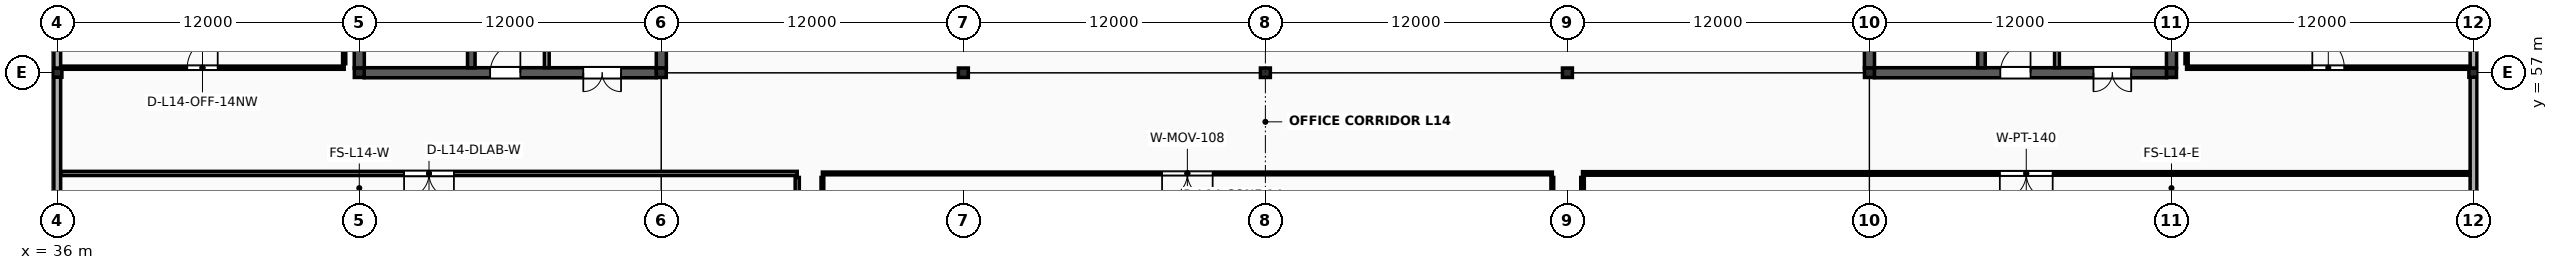
"""IFC4 building model, lengths in metres.
Left out: names, types, materials, properties, quantities, classifications, styles, units other than length and angle.
Written with IfcOpenShell. Run it as: python <this file> out.ifc"""

import sys

from ifc_helpers import new_model, si_unit, direction, frame, frame_2d, origin, origin_2d, place, context, subcontext, project, spatial, rectangle, i_section, extrude, element, fill, save


model = new_model("IFC4")
c1 = context("Model", 3, precision=1e-05, world=origin(), true_north=direction((0.0, 1.0)))
c2 = subcontext(c1, "Body", "Model", "MODEL_VIEW")
j1 = project(units=[si_unit("LENGTHUNIT", "METRE"), si_unit("PLANEANGLEUNIT", "RADIAN")], contexts=[c1])
p1 = place(None, origin())
s1 = spatial("IfcSite", under=j1, at=p1, CompositionType="ELEMENT")
p2 = place(p1, origin())
s2 = spatial("IfcBuilding", under=s1, at=p2, CompositionType="ELEMENT")
p3 = place(p2, frame((0.0, 0.0, 57.6)))
s3 = spatial("IfcBuildingStorey", under=s2, at=p3, CompositionType="ELEMENT", Elevation=57.6)
p4 = place(p3, frame((36.0, 57.0, 0.0), z_axis=(0.0, 0.0, 1.0), x_axis=(1.0, 0.0, 0.0)))
e1 = element("IfcColumn", 1, at=p4, inside=s3, PredefinedType="COLUMN", context=c2, shape_type="SweptSolid", body=[
    extrude(i_section(OverallWidth=0.369, OverallDepth=0.356, WebThickness=0.011, FlangeThickness=0.018, FilletRadius=0.018, at=origin_2d()), origin(), (0.0, 0.0, 1.0), 4.0),
])
for number, where, z_axis, x_axis in (
    (2, (48.0, 57.0, 0.0), (0.0, 0.0, 1.0), (1.0, 0.0, 0.0)),
    (3, (60.0, 57.0, 0.0), (0.0, 0.0, 1.0), (1.0, 0.0, 0.0)),
    (4, (72.0, 57.0, 0.0), (0.0, 0.0, 1.0), (1.0, 0.0, 0.0)),
    (5, (84.0, 57.0, 0.0), (0.0, 0.0, 1.0), (1.0, 0.0, 0.0)),
    (6, (96.0, 57.0, 0.0), (0.0, 0.0, 1.0), (1.0, 0.0, 0.0)),
    (7, (108.0, 57.0, 0.0), (0.0, 0.0, 1.0), (1.0, 0.0, 0.0)),
    (8, (120.0, 57.0, 0.0), (0.0, 0.0, 1.0), (1.0, 0.0, 0.0)),
):
    element("IfcColumn", number, at=place(p3, frame(where, z_axis=z_axis, x_axis=x_axis)), inside=s3, PredefinedType="COLUMN", context=c2, shape_type="SweptSolid", body=[
        extrude(i_section(OverallWidth=0.394, OverallDepth=0.375, WebThickness=0.017, FlangeThickness=0.028, FilletRadius=0.018, at=origin_2d()), origin(), (0.0, 0.0, 1.0), 4.0),
    ])
p5 = place(p3, frame((132.0, 57.0, 0.0), z_axis=(0.0, 0.0, 1.0), x_axis=(1.0, 0.0, 0.0)))
e9 = element("IfcColumn", 9, at=p5, inside=s3, PredefinedType="COLUMN", context=c2, shape_type="SweptSolid", body=[
    extrude(i_section(OverallWidth=0.369, OverallDepth=0.356, WebThickness=0.011, FlangeThickness=0.018, FilletRadius=0.018, at=origin_2d()), origin(), (0.0, 0.0, 1.0), 4.0),
])
p6 = place(p3, frame((48.194, 57.0, 0.0), z_axis=(0.0, 0.0, 1.0), x_axis=(1.0, 0.0, 0.0)))
e10 = element("IfcWall", 10, at=p6, inside=s3, PredefinedType="SHEAR", context=c2, shape_type="SweptSolid", body=[
    extrude(rectangle(XDim=11.612, YDim=0.4, at=frame_2d((5.806, 0.0))), origin(), (0.0, 0.0, 1.0), 3.853),
])
p7 = place(p6, frame((5.006, 0.0, 0.0)))
e11 = element("IfcOpeningElement", 11, at=p7, cuts=e10, PredefinedType="OPENING", context=c2, shape_type="SweptSolid", body=[
    extrude(rectangle(XDim=1.2, YDim=2.2, at=frame_2d((0.6, 1.1))), frame((0.0, 0.215, 0.0), z_axis=(0.0, -1.0, 0.0), x_axis=(1.0, 0.0, 0.0)), (0.0, 0.0, 1.0), 0.43),
])
p8 = place(p6, frame((8.706, 0.0, 0.0)))
e12 = element("IfcOpeningElement", 12, at=p8, cuts=e10, PredefinedType="OPENING", context=c2, shape_type="SweptSolid", body=[
    extrude(rectangle(XDim=1.5, YDim=2.25, at=frame_2d((0.75, 1.125))), frame((0.0, 0.215, 0.0), z_axis=(0.0, -1.0, 0.0), x_axis=(1.0, 0.0, 0.0)), (0.0, 0.0, 1.0), 0.43),
])
for number, where, z_axis, x_axis in (
    (13, (48.0, 57.185, 0.0), (0.0, 0.0, 1.0), (0.0, 1.0, 0.0)),
    (14, (60.0, 57.185, 0.0), (0.0, 0.0, 1.0), (0.0, 1.0, 0.0)),
):
    element("IfcWall", number, at=place(p3, frame(where, z_axis=z_axis, x_axis=x_axis)), inside=s3, PredefinedType="SHEAR", context=c2, shape_type="SweptSolid", body=[
        extrude(rectangle(XDim=11.64, YDim=0.4, at=frame_2d((5.82, 0.0))), origin(), (0.0, 0.0, 1.0), 3.853),
    ])
p9 = place(p3, frame((52.45, 57.197, 0.0), z_axis=(0.0, 0.0, 1.0), x_axis=(0.0, 1.0, 0.0)))
e15 = element("IfcWall", 15, at=p9, inside=s3, PredefinedType="SHEAR", context=c2, shape_type="SweptSolid", body=[
    extrude(rectangle(XDim=11.606, YDim=0.3, at=frame_2d((5.803, 0.0))), origin(), (0.0, 0.0, 1.0), 3.853),
])
p10 = place(p9, frame((0.9, 0.0, 0.0)))
e16 = element("IfcOpeningElement", 16, at=p10, cuts=e15, PredefinedType="OPENING", context=c2, shape_type="SweptSolid", body=[
    extrude(rectangle(XDim=1.1, YDim=2.2, at=frame_2d((0.55, 1.1))), frame((0.0, 0.165, 0.0), z_axis=(0.0, -1.0, 0.0), x_axis=(1.0, 0.0, 0.0)), (0.0, 0.0, 1.0), 0.33),
])
p11 = place(p3, frame((55.45, 57.2, 0.0), z_axis=(0.0, 0.0, 1.0), x_axis=(0.0, 1.0, 0.0)))
e17 = element("IfcWall", 17, at=p11, inside=s3, PredefinedType="SOLIDWALL", context=c2, shape_type="SweptSolid", body=[
    extrude(rectangle(XDim=8.48, YDim=0.19, at=frame_2d((4.24, 0.0))), origin(), (0.0, 0.0, 1.0), 3.843),
])
p12 = place(p11, frame((3.6, 0.0, 0.0)))
e18 = element("IfcOpeningElement", 18, at=p12, cuts=e17, PredefinedType="OPENING", context=c2, shape_type="SweptSolid", body=[
    extrude(rectangle(XDim=1.04, YDim=2.18, at=frame_2d((0.52, 1.09))), frame((0.0, 0.11, 0.0), z_axis=(0.0, -1.0, 0.0), x_axis=(1.0, 0.0, 0.0)), (0.0, 0.0, 1.0), 0.22),
])
p13 = place(p3, frame((108.194, 57.0, 0.0), z_axis=(0.0, 0.0, 1.0), x_axis=(1.0, 0.0, 0.0)))
e19 = element("IfcWall", 19, at=p13, inside=s3, PredefinedType="SHEAR", context=c2, shape_type="SweptSolid", body=[
    extrude(rectangle(XDim=11.612, YDim=0.4, at=frame_2d((5.806, 0.0))), origin(), (0.0, 0.0, 1.0), 3.853),
])
p14 = place(p13, frame((5.006, 0.0, 0.0)))
e20 = element("IfcOpeningElement", 20, at=p14, cuts=e19, PredefinedType="OPENING", context=c2, shape_type="SweptSolid", body=[
    extrude(rectangle(XDim=1.2, YDim=2.2, at=frame_2d((0.6, 1.1))), frame((0.0, 0.215, 0.0), z_axis=(0.0, -1.0, 0.0), x_axis=(1.0, 0.0, 0.0)), (0.0, 0.0, 1.0), 0.43),
])
p15 = place(p13, frame((8.706, 0.0, 0.0)))
e21 = element("IfcOpeningElement", 21, at=p15, cuts=e19, PredefinedType="OPENING", context=c2, shape_type="SweptSolid", body=[
    extrude(rectangle(XDim=1.5, YDim=2.25, at=frame_2d((0.75, 1.125))), frame((0.0, 0.215, 0.0), z_axis=(0.0, -1.0, 0.0), x_axis=(1.0, 0.0, 0.0)), (0.0, 0.0, 1.0), 0.43),
])
for number, where, z_axis, x_axis in (
    (22, (108.0, 57.185, 0.0), (0.0, 0.0, 1.0), (0.0, 1.0, 0.0)),
    (23, (120.0, 57.185, 0.0), (0.0, 0.0, 1.0), (0.0, 1.0, 0.0)),
):
    element("IfcWall", number, at=place(p3, frame(where, z_axis=z_axis, x_axis=x_axis)), inside=s3, PredefinedType="SHEAR", context=c2, shape_type="SweptSolid", body=[
        extrude(rectangle(XDim=11.64, YDim=0.4, at=frame_2d((5.82, 0.0))), origin(), (0.0, 0.0, 1.0), 3.853),
    ])
p16 = place(p3, frame((112.45, 57.197, 0.0), z_axis=(0.0, 0.0, 1.0), x_axis=(0.0, 1.0, 0.0)))
e24 = element("IfcWall", 24, at=p16, inside=s3, PredefinedType="SHEAR", context=c2, shape_type="SweptSolid", body=[
    extrude(rectangle(XDim=11.606, YDim=0.3, at=frame_2d((5.803, 0.0))), origin(), (0.0, 0.0, 1.0), 3.853),
])
p17 = place(p16, frame((0.9, 0.0, 0.0)))
e25 = element("IfcOpeningElement", 25, at=p17, cuts=e24, PredefinedType="OPENING", context=c2, shape_type="SweptSolid", body=[
    extrude(rectangle(XDim=1.1, YDim=2.2, at=frame_2d((0.55, 1.1))), frame((0.0, 0.165, 0.0), z_axis=(0.0, -1.0, 0.0), x_axis=(1.0, 0.0, 0.0)), (0.0, 0.0, 1.0), 0.33),
])
p18 = place(p3, frame((115.45, 57.2, 0.0), z_axis=(0.0, 0.0, 1.0), x_axis=(0.0, 1.0, 0.0)))
e26 = element("IfcWall", 26, at=p18, inside=s3, PredefinedType="SOLIDWALL", context=c2, shape_type="SweptSolid", body=[
    extrude(rectangle(XDim=8.48, YDim=0.19, at=frame_2d((4.24, 0.0))), origin(), (0.0, 0.0, 1.0), 3.843),
])
p19 = place(p18, frame((3.6, 0.0, 0.0)))
e27 = element("IfcOpeningElement", 27, at=p19, cuts=e26, PredefinedType="OPENING", context=c2, shape_type="SweptSolid", body=[
    extrude(rectangle(XDim=1.04, YDim=2.18, at=frame_2d((0.52, 1.09))), frame((0.0, 0.11, 0.0), z_axis=(0.0, -1.0, 0.0), x_axis=(1.0, 0.0, 0.0)), (0.0, 0.0, 1.0), 0.22),
])
p20 = place(p3, frame((36.0, 45.176, 0.0), z_axis=(0.0, 0.0, 1.0), x_axis=(0.0, 1.0, 0.0)))
e28 = element("IfcWall", 28, at=p20, inside=s3, PredefinedType="SOLIDWALL", context=c2, shape_type="SweptSolid", body=[
    extrude(rectangle(XDim=11.648, YDim=0.27, at=frame_2d((5.824, 0.0))), origin(), (0.0, 0.0, 1.0), 3.216),
])
p21 = place(p20, frame((5.094, 0.0, 0.78)))
e29 = element("IfcOpeningElement", 29, at=p21, cuts=e28, PredefinedType="OPENING", context=c2, shape_type="SweptSolid", body=[
    extrude(rectangle(XDim=1.46, YDim=1.74, at=frame_2d((0.73, 0.87))), frame((0.0, 0.15, 0.0), z_axis=(0.0, -1.0, 0.0), x_axis=(1.0, 0.0, 0.0)), (0.0, 0.0, 1.0), 0.3),
])
p22 = place(p3, frame((36.0, 57.176, 0.0), z_axis=(0.0, 0.0, 1.0), x_axis=(0.0, 1.0, 0.0)))
e30 = element("IfcWall", 30, at=p22, inside=s3, PredefinedType="SOLIDWALL", context=c2, shape_type="SweptSolid", body=[
    extrude(rectangle(XDim=11.648, YDim=0.27, at=frame_2d((5.824, 0.0))), origin(), (0.0, 0.0, 1.0), 3.216),
])
p23 = place(p22, frame((5.004, 0.0, 0.78)))
e31 = element("IfcOpeningElement", 31, at=p23, cuts=e30, PredefinedType="OPENING", context=c2, shape_type="SweptSolid", body=[
    extrude(rectangle(XDim=1.64, YDim=1.74, at=frame_2d((0.82, 0.87))), frame((0.0, 0.15, 0.0), z_axis=(0.0, -1.0, 0.0), x_axis=(1.0, 0.0, 0.0)), (0.0, 0.0, 1.0), 0.3),
])
p24 = place(p3, frame((132.0, 45.176, 0.0), z_axis=(0.0, 0.0, 1.0), x_axis=(0.0, 1.0, 0.0)))
e32 = element("IfcWall", 32, at=p24, inside=s3, PredefinedType="SOLIDWALL", context=c2, shape_type="SweptSolid", body=[
    extrude(rectangle(XDim=11.648, YDim=0.27, at=frame_2d((5.824, 0.0))), origin(), (0.0, 0.0, 1.0), 3.216),
])
p25 = place(p24, frame((4.894, 0.0, 0.78)))
e33 = element("IfcOpeningElement", 33, at=p25, cuts=e32, PredefinedType="OPENING", context=c2, shape_type="SweptSolid", body=[
    extrude(rectangle(XDim=1.86, YDim=1.74, at=frame_2d((0.93, 0.87))), frame((0.0, 0.15, 0.0), z_axis=(0.0, -1.0, 0.0), x_axis=(1.0, 0.0, 0.0)), (0.0, 0.0, 1.0), 0.3),
])
p26 = place(p3, frame((132.0, 57.176, 0.0), z_axis=(0.0, 0.0, 1.0), x_axis=(0.0, 1.0, 0.0)))
e34 = element("IfcWall", 34, at=p26, inside=s3, PredefinedType="SOLIDWALL", context=c2, shape_type="SweptSolid", body=[
    extrude(rectangle(XDim=11.648, YDim=0.27, at=frame_2d((5.824, 0.0))), origin(), (0.0, 0.0, 1.0), 3.216),
])
p27 = place(p26, frame((4.804, 0.0, 0.78)))
e35 = element("IfcOpeningElement", 35, at=p27, cuts=e34, PredefinedType="OPENING", context=c2, shape_type="SweptSolid", body=[
    extrude(rectangle(XDim=2.04, YDim=1.74, at=frame_2d((1.02, 0.87))), frame((0.0, 0.15, 0.0), z_axis=(0.0, -1.0, 0.0), x_axis=(1.0, 0.0, 0.0)), (0.0, 0.0, 1.0), 0.3),
])
p28 = place(p3, frame((36.14, 53.0, 0.0), z_axis=(0.0, 0.0, 1.0), x_axis=(1.0, 0.0, 0.0)))
e36 = element("IfcWall", 36, at=p28, inside=s3, PredefinedType="PARTITIONING", context=c2, shape_type="SweptSolid", body=[
    extrude(rectangle(XDim=29.26, YDim=0.165, at=frame_2d((14.63, 0.0))), origin(), (0.0, 0.0, 1.0), 2.88),
])
p29 = place(p28, frame((13.64, 0.0, 0.0)))
e37 = element("IfcOpeningElement", 37, at=p29, cuts=e36, PredefinedType="OPENING", context=c2, shape_type="SweptSolid", body=[
    extrude(rectangle(XDim=1.98, YDim=2.4, at=frame_2d((0.99, 1.2))), frame((0.0, 0.097, 0.0), z_axis=(0.0, -1.0, 0.0), x_axis=(1.0, 0.0, 0.0)), (0.0, 0.0, 1.0), 0.195),
])
p30 = place(p3, frame((65.4, 45.14, 0.0), z_axis=(0.0, 0.0, 1.0), x_axis=(0.0, 1.0, 0.0)))
e38 = element("IfcWall", 38, at=p30, inside=s3, PredefinedType="PARTITIONING", context=c2, shape_type="SweptSolid", body=[
    extrude(rectangle(XDim=7.7, YDim=0.165, at=frame_2d((3.85, 0.0))), origin(), (0.0, 0.0, 1.0), 2.88),
])
p31 = place(p3, frame((66.4, 53.0, 0.0), z_axis=(0.0, 0.0, 1.0), x_axis=(1.0, 0.0, 0.0)))
e39 = element("IfcWall", 39, at=p31, inside=s3, PredefinedType="MOVABLE", context=c2, shape_type="SweptSolid", body=[
    extrude(rectangle(XDim=29.0, YDim=0.108, at=frame_2d((14.5, 0.0))), origin(), (0.0, 0.0, 1.0), 2.88),
])
p32 = place(p31, frame((13.495, 0.0, 0.0)))
e40 = element("IfcOpeningElement", 40, at=p32, cuts=e39, PredefinedType="OPENING", context=c2, shape_type="SweptSolid", body=[
    extrude(rectangle(XDim=2.01, YDim=2.45, at=frame_2d((1.005, 1.225))), frame((0.0, 0.069, 0.0), z_axis=(0.0, -1.0, 0.0), x_axis=(1.0, 0.0, 0.0)), (0.0, 0.0, 1.0), 0.138),
])
for number, where, z_axis, x_axis in (
    (41, (66.4, 45.14, 0.0), (0.0, 0.0, 1.0), (0.0, 1.0, 0.0)),
    (42, (95.4, 45.14, 0.0), (0.0, 0.0, 1.0), (0.0, 1.0, 0.0)),
):
    element("IfcWall", number, at=place(p3, frame(where, z_axis=z_axis, x_axis=x_axis)), inside=s3, PredefinedType="MOVABLE", context=c2, shape_type="SweptSolid", body=[
        extrude(rectangle(XDim=7.7, YDim=0.108, at=frame_2d((3.85, 0.0))), origin(), (0.0, 0.0, 1.0), 2.88),
    ])
p33 = place(p3, frame((96.6, 53.0, 0.0), z_axis=(0.0, 0.0, 1.0), x_axis=(1.0, 0.0, 0.0)))
e43 = element("IfcWall", 43, at=p33, inside=s3, PredefinedType="PARTITIONING", context=c2, shape_type="SweptSolid", body=[
    extrude(rectangle(XDim=35.26, YDim=0.14, at=frame_2d((17.63, 0.0))), origin(), (0.0, 0.0, 1.0), 2.88),
])
p34 = place(p33, frame((16.58, 0.0, 0.0)))
e44 = element("IfcOpeningElement", 44, at=p34, cuts=e43, PredefinedType="OPENING", context=c2, shape_type="SweptSolid", body=[
    extrude(rectangle(XDim=2.1, YDim=2.47, at=frame_2d((1.05, 1.235))), frame((0.0, 0.085, 0.0), z_axis=(0.0, -1.0, 0.0), x_axis=(1.0, 0.0, 0.0)), (0.0, 0.0, 1.0), 0.17),
])
p35 = place(p3, frame((96.6, 45.14, 0.0), z_axis=(0.0, 0.0, 1.0), x_axis=(0.0, 1.0, 0.0)))
e45 = element("IfcWall", 45, at=p35, inside=s3, PredefinedType="PARTITIONING", context=c2, shape_type="SweptSolid", body=[
    extrude(rectangle(XDim=7.7, YDim=0.14, at=frame_2d((3.85, 0.0))), origin(), (0.0, 0.0, 1.0), 2.88),
])
p36 = place(p3, frame((36.14, 57.2, 0.0), z_axis=(0.0, 0.0, 1.0), x_axis=(1.0, 0.0, 0.0)))
e46 = element("IfcWall", 46, at=p36, inside=s3, PredefinedType="PARTITIONING", context=c2, shape_type="SweptSolid", body=[
    extrude(rectangle(XDim=11.26, YDim=0.125, at=frame_2d((5.63, 0.0))), origin(), (0.0, 0.0, 1.0), 2.88),
])
p37 = place(p36, frame((5.025, 0.0, 0.0)))
e47 = element("IfcOpeningElement", 47, at=p37, cuts=e46, PredefinedType="OPENING", context=c2, shape_type="SweptSolid", body=[
    extrude(rectangle(XDim=1.21, YDim=2.25, at=frame_2d((0.605, 1.125))), frame((0.0, 0.077, 0.0), z_axis=(0.0, -1.0, 0.0), x_axis=(1.0, 0.0, 0.0)), (0.0, 0.0, 1.0), 0.155),
])
p38 = place(p3, frame((47.4, 57.36, 0.0), z_axis=(0.0, 0.0, 1.0), x_axis=(0.0, 1.0, 0.0)))
e48 = element("IfcWall", 48, at=p38, inside=s3, PredefinedType="PARTITIONING", context=c2, shape_type="SweptSolid", body=[
    extrude(rectangle(XDim=11.5, YDim=0.125, at=frame_2d((5.75, 0.0))), origin(), (0.0, 0.0, 1.0), 2.88),
])
p39 = place(p3, frame((120.6, 57.2, 0.0), z_axis=(0.0, 0.0, 1.0), x_axis=(1.0, 0.0, 0.0)))
e49 = element("IfcWall", 49, at=p39, inside=s3, PredefinedType="PARTITIONING", context=c2, shape_type="SweptSolid", body=[
    extrude(rectangle(XDim=11.26, YDim=0.125, at=frame_2d((5.63, 0.0))), origin(), (0.0, 0.0, 1.0), 2.88),
])
p40 = place(p39, frame((4.995, 0.0, 0.0)))
e50 = element("IfcOpeningElement", 50, at=p40, cuts=e49, PredefinedType="OPENING", context=c2, shape_type="SweptSolid", body=[
    extrude(rectangle(XDim=1.27, YDim=2.27, at=frame_2d((0.635, 1.135))), frame((0.0, 0.077, 0.0), z_axis=(0.0, -1.0, 0.0), x_axis=(1.0, 0.0, 0.0)), (0.0, 0.0, 1.0), 0.155),
])
p41 = place(p3, frame((120.6, 57.36, 0.0), z_axis=(0.0, 0.0, 1.0), x_axis=(0.0, 1.0, 0.0)))
e51 = element("IfcWall", 51, at=p41, inside=s3, PredefinedType="PARTITIONING", context=c2, shape_type="SweptSolid", body=[
    extrude(rectangle(XDim=11.5, YDim=0.125, at=frame_2d((5.75, 0.0))), origin(), (0.0, 0.0, 1.0), 2.88),
])
p42 = place(p7, origin())
e52 = element("IfcDoor", 52, at=p42, inside=s3, OperationType="SINGLE_SWING_RIGHT", PredefinedType="DOOR", context=c2, shape_type="SweptSolid", body=[
    extrude(rectangle(XDim=1.2, YDim=2.2, at=frame_2d((0.6, 1.1))), frame((0.0, 0.025, 0.0), z_axis=(0.0, -1.0, 0.0), x_axis=(1.0, 0.0, 0.0)), (0.0, 0.0, 1.0), 0.05),
])
fill(e11, e52)
p43 = place(p8, origin())
e53 = element("IfcDoor", 53, at=p43, inside=s3, OperationType="DOUBLE_DOOR_SINGLE_SWING", PredefinedType="DOOR", context=c2, shape_type="SweptSolid", body=[
    extrude(rectangle(XDim=1.5, YDim=2.25, at=frame_2d((0.75, 1.125))), frame((0.0, 0.025, 0.0), z_axis=(0.0, -1.0, 0.0), x_axis=(1.0, 0.0, 0.0)), (0.0, 0.0, 1.0), 0.05),
])
fill(e12, e53)
p44 = place(p14, origin())
e54 = element("IfcDoor", 54, at=p44, inside=s3, OperationType="SINGLE_SWING_RIGHT", PredefinedType="DOOR", context=c2, shape_type="SweptSolid", body=[
    extrude(rectangle(XDim=1.2, YDim=2.2, at=frame_2d((0.6, 1.1))), frame((0.0, 0.025, 0.0), z_axis=(0.0, -1.0, 0.0), x_axis=(1.0, 0.0, 0.0)), (0.0, 0.0, 1.0), 0.05),
])
fill(e20, e54)
p45 = place(p15, origin())
e55 = element("IfcDoor", 55, at=p45, inside=s3, OperationType="DOUBLE_DOOR_SINGLE_SWING", PredefinedType="DOOR", context=c2, shape_type="SweptSolid", body=[
    extrude(rectangle(XDim=1.5, YDim=2.25, at=frame_2d((0.75, 1.125))), frame((0.0, 0.025, 0.0), z_axis=(0.0, -1.0, 0.0), x_axis=(1.0, 0.0, 0.0)), (0.0, 0.0, 1.0), 0.05),
])
fill(e21, e55)
p46 = place(p29, origin())
e56 = element("IfcDoor", 56, at=p46, inside=s3, OperationType="DOUBLE_DOOR_SINGLE_SWING", PredefinedType="DOOR", context=c2, shape_type="SweptSolid", body=[
    extrude(rectangle(XDim=1.98, YDim=2.4, at=frame_2d((0.99, 1.2))), frame((0.0, 0.025, 0.0), z_axis=(0.0, -1.0, 0.0), x_axis=(1.0, 0.0, 0.0)), (0.0, 0.0, 1.0), 0.05),
])
fill(e37, e56)
p47 = place(p32, origin())
e57 = element("IfcDoor", 57, at=p47, inside=s3, OperationType="DOUBLE_DOOR_SINGLE_SWING", PredefinedType="DOOR", context=c2, shape_type="SweptSolid", body=[
    extrude(rectangle(XDim=2.01, YDim=2.45, at=frame_2d((1.005, 1.225))), frame((0.0, 0.025, 0.0), z_axis=(0.0, -1.0, 0.0), x_axis=(1.0, 0.0, 0.0)), (0.0, 0.0, 1.0), 0.05),
])
fill(e40, e57)
p48 = place(p34, origin())
e58 = element("IfcDoor", 58, at=p48, inside=s3, OperationType="DOUBLE_DOOR_SINGLE_SWING", PredefinedType="DOOR", context=c2, shape_type="SweptSolid", body=[
    extrude(rectangle(XDim=2.1, YDim=2.47, at=frame_2d((1.05, 1.235))), frame((0.0, 0.025, 0.0), z_axis=(0.0, -1.0, 0.0), x_axis=(1.0, 0.0, 0.0)), (0.0, 0.0, 1.0), 0.05),
])
fill(e44, e58)
p49 = place(p37, origin())
e59 = element("IfcDoor", 59, at=p49, inside=s3, OperationType="SINGLE_SWING_RIGHT", PredefinedType="DOOR", context=c2, shape_type="SweptSolid", body=[
    extrude(rectangle(XDim=1.21, YDim=2.25, at=frame_2d((0.605, 1.125))), frame((0.0, 0.025, 0.0), z_axis=(0.0, -1.0, 0.0), x_axis=(1.0, 0.0, 0.0)), (0.0, 0.0, 1.0), 0.05),
])
fill(e47, e59)
p50 = place(p40, origin())
e60 = element("IfcDoor", 60, at=p50, inside=s3, OperationType="SINGLE_SWING_LEFT", PredefinedType="DOOR", context=c2, shape_type="SweptSolid", body=[
    extrude(rectangle(XDim=1.27, YDim=2.27, at=frame_2d((0.635, 1.135))), frame((0.0, 0.025, 0.0), z_axis=(0.0, -1.0, 0.0), x_axis=(1.0, 0.0, 0.0)), (0.0, 0.0, 1.0), 0.05),
])
fill(e50, e60)
save(model, sys.argv[1])
